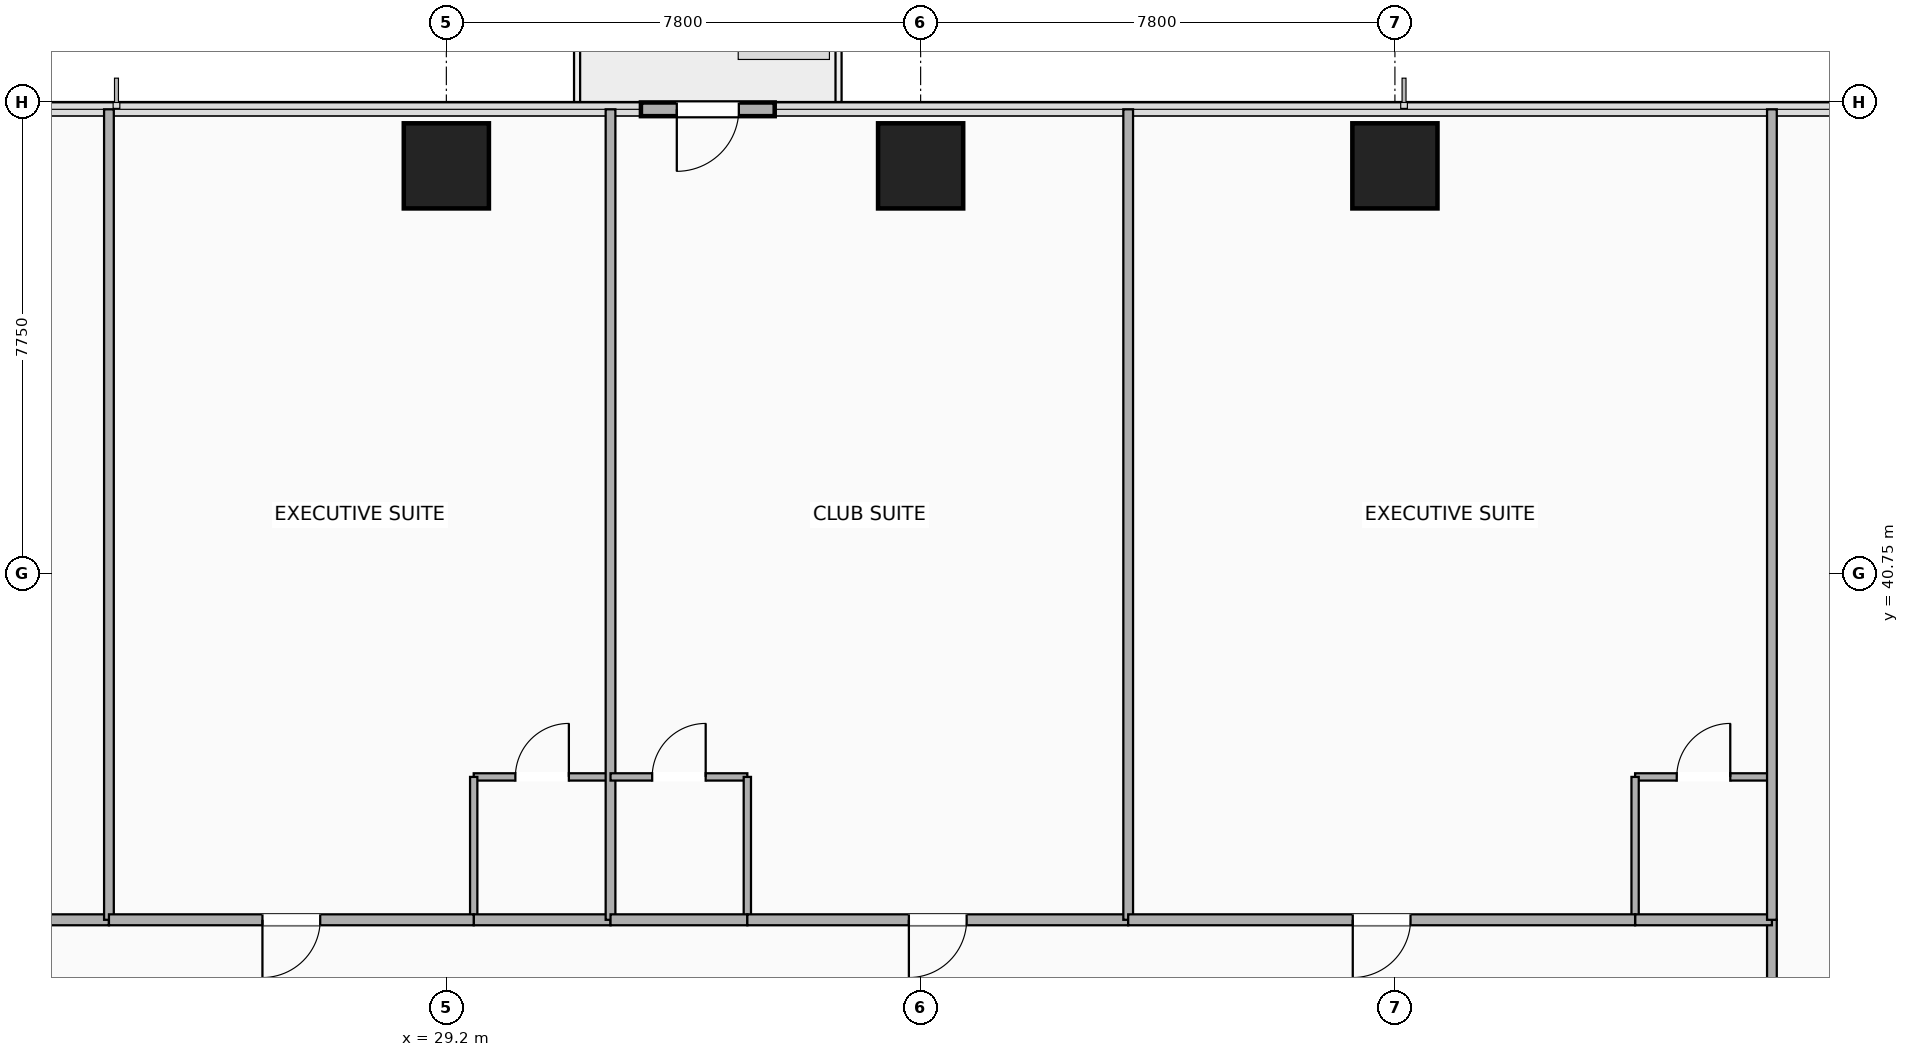
"""IFC4 building model, lengths in metres.
Left out: names, types, materials, properties, quantities, classifications, styles, units other than length and angle.
Written with IfcOpenShell. Run it as: python <this file> out.ifc"""

import sys

from ifc_helpers import new_model, si_unit, direction, frame, frame_2d, origin, origin_2d, place, context, subcontext, project, spatial, rectangle, extrude, element, fill, save


model = new_model("IFC4")
c1 = context("Model", 3, precision=1e-05, world=origin(), true_north=direction((0.0, 1.0)))
c2 = subcontext(c1, "Body", "Model", "MODEL_VIEW")
j1 = project(units=[si_unit("LENGTHUNIT", "METRE"), si_unit("PLANEANGLEUNIT", "RADIAN")], contexts=[c1])
p1 = place(None, origin())
s1 = spatial("IfcSite", under=j1, at=p1, CompositionType="ELEMENT")
p2 = place(p1, origin())
s2 = spatial("IfcBuilding", under=s1, at=p2, CompositionType="ELEMENT")
p3 = place(p2, frame((0.0, 0.0, 71.9)))
s3 = spatial("IfcBuildingStorey", under=s2, at=p3, CompositionType="ELEMENT", Elevation=71.9)
for number, where, z_axis, x_axis in (
    (1, (29.2, 47.45, -0.28), (0.0, 0.0, 1.0), (1.0, 0.0, 0.0)),
    (2, (37.0, 47.45, -0.28), (0.0, 0.0, 1.0), (1.0, 0.0, 0.0)),
    (3, (44.8, 47.45, -0.28), (0.0, 0.0, 1.0), (1.0, 0.0, 0.0)),
):
    element("IfcColumn", number, at=place(p3, frame(where, z_axis=z_axis, x_axis=x_axis)), inside=s3, PredefinedType="COLUMN", context=c2, shape_type="SweptSolid", body=[
        extrude(rectangle(XDim=1.4, YDim=1.4, at=origin_2d()), origin(), (0.0, 0.0, 1.0), 3.46),
    ])
p4 = place(p3, frame((32.4, 48.38, 0.0), z_axis=(0.0, 0.0, 1.0), x_axis=(1.0, 0.0, 0.0)))
e4 = element("IfcWall", 4, at=p4, inside=s3, PredefinedType="SOLIDWALL", context=c2, shape_type="SweptSolid", body=[
    extrude(rectangle(XDim=2.2, YDim=0.225, at=frame_2d((1.1, 0.0))), origin(), (0.0, 0.0, 1.0), 3.18),
])
p5 = place(p4, frame((0.59, 0.0, 0.0)))
e5 = element("IfcOpeningElement", 5, at=p5, cuts=e4, PredefinedType="OPENING", context=c2, shape_type="SweptSolid", body=[
    extrude(rectangle(XDim=1.02, YDim=2.1, at=frame_2d((0.51, 1.05))), frame((0.0, 0.123, 0.0), z_axis=(0.0, -1.0, 0.0), x_axis=(1.0, 0.0, 0.0)), (0.0, 0.0, 1.0), 0.245),
])
p6 = place(p3, frame((51.0, 33.0, 0.0), z_axis=(0.0, 0.0, 1.0), x_axis=(0.0, 1.0, 0.0)))
e6 = element("IfcWall", 6, at=p6, inside=s3, PredefinedType="PARTITIONING", context=c2, shape_type="SweptSolid", body=[
    extrude(rectangle(XDim=2.05, YDim=0.16, at=frame_2d((1.025, 0.0))), origin(), (0.0, 0.0, 1.0), 2.47),
])
p7 = place(p3, frame((17.52, 35.05, 0.0), z_axis=(0.0, 0.0, 1.0), x_axis=(1.0, 0.0, 0.0)))
e7 = element("IfcWall", 7, at=p7, inside=s3, PredefinedType="PARTITIONING", context=c2, shape_type="SweptSolid", body=[
    extrude(rectangle(XDim=6.131, YDim=0.18, at=frame_2d((3.065, 0.0))), origin(), (0.0, 0.0, 1.0), 2.47),
])
p8 = place(p7, frame((2.591, 0.0, 0.0)))
e8 = element("IfcOpeningElement", 8, at=p8, cuts=e7, PredefinedType="OPENING", context=c2, shape_type="SweptSolid", body=[
    extrude(rectangle(XDim=0.95, YDim=2.15, at=frame_2d((0.475, 1.075))), frame((0.0, 0.1, 0.0), z_axis=(0.0, -1.0, 0.0), x_axis=(1.0, 0.0, 0.0)), (0.0, 0.0, 1.0), 0.2),
])
p9 = place(p3, frame((23.651, 35.05, 0.0), z_axis=(0.0, 0.0, 1.0), x_axis=(0.0, 1.0, 0.0)))
e9 = element("IfcWall", 9, at=p9, inside=s3, PredefinedType="PARTITIONING", context=c2, shape_type="SweptSolid", body=[
    extrude(rectangle(XDim=13.33, YDim=0.16, at=frame_2d((6.665, 0.0))), origin(), (0.0, 0.0, 1.0), 2.543),
])
p10 = place(p3, frame((29.65, 37.4, 0.0), z_axis=(0.0, 0.0, 1.0), x_axis=(1.0, 0.0, 0.0)))
e10 = element("IfcWall", 10, at=p10, inside=s3, PredefinedType="PARTITIONING", context=c2, shape_type="SweptSolid", body=[
    extrude(rectangle(XDim=2.25, YDim=0.12, at=frame_2d((1.125, 0.0))), origin(), (0.0, 0.0, 1.0), 3.18),
])
p11 = place(p10, frame((1.565, 0.0, 0.0), z_axis=(0.0, 0.0, 1.0), x_axis=(-1.0, 0.0, 0.0)))
e11 = element("IfcOpeningElement", 11, at=p11, cuts=e10, PredefinedType="OPENING", context=c2, shape_type="SweptSolid", body=[
    extrude(rectangle(XDim=0.88, YDim=2.08, at=frame_2d((0.44, 1.04))), frame((0.0, 0.07, 0.0), z_axis=(0.0, -1.0, 0.0), x_axis=(1.0, 0.0, 0.0)), (0.0, 0.0, 1.0), 0.14),
])
p12 = place(p3, frame((29.65, 35.05, 0.0), z_axis=(0.0, 0.0, 1.0), x_axis=(0.0, 1.0, 0.0)))
e12 = element("IfcWall", 12, at=p12, inside=s3, PredefinedType="PARTITIONING", context=c2, shape_type="SweptSolid", body=[
    extrude(rectangle(XDim=2.35, YDim=0.12, at=frame_2d((1.175, 0.0))), origin(), (0.0, 0.0, 1.0), 2.862),
])
p13 = place(p3, frame((29.65, 35.05, 0.0), z_axis=(0.0, 0.0, 1.0), x_axis=(1.0, 0.0, 0.0)))
e13 = element("IfcWall", 13, at=p13, inside=s3, PredefinedType="PARTITIONING", context=c2, shape_type="SweptSolid", body=[
    extrude(rectangle(XDim=2.25, YDim=0.18, at=frame_2d((1.125, 0.0))), origin(), (0.0, 0.0, 1.0), 3.18),
])
p14 = place(p3, frame((23.651, 35.05, 0.0), z_axis=(0.0, 0.0, 1.0), x_axis=(1.0, 0.0, 0.0)))
e14 = element("IfcWall", 14, at=p14, inside=s3, PredefinedType="PARTITIONING", context=c2, shape_type="SweptSolid", body=[
    extrude(rectangle(XDim=5.999, YDim=0.18, at=frame_2d((3.0, 0.0))), origin(), (0.0, 0.0, 1.0), 2.47),
])
p15 = place(p14, frame((2.524, 0.0, 0.0)))
e15 = element("IfcOpeningElement", 15, at=p15, cuts=e14, PredefinedType="OPENING", context=c2, shape_type="SweptSolid", body=[
    extrude(rectangle(XDim=0.95, YDim=2.15, at=frame_2d((0.475, 1.075))), frame((0.0, 0.1, 0.0), z_axis=(0.0, -1.0, 0.0), x_axis=(1.0, 0.0, 0.0)), (0.0, 0.0, 1.0), 0.2),
])
p16 = place(p3, frame((31.9, 35.05, 0.0), z_axis=(0.0, 0.0, 1.0), x_axis=(0.0, 1.0, 0.0)))
e16 = element("IfcWall", 16, at=p16, inside=s3, PredefinedType="PARTITIONING", context=c2, shape_type="SweptSolid", body=[
    extrude(rectangle(XDim=13.33, YDim=0.16, at=frame_2d((6.665, 0.0))), origin(), (0.0, 0.0, 1.0), 2.543),
])
p17 = place(p3, frame((31.9, 37.4, 0.0), z_axis=(0.0, 0.0, 1.0), x_axis=(1.0, 0.0, 0.0)))
e17 = element("IfcWall", 17, at=p17, inside=s3, PredefinedType="PARTITIONING", context=c2, shape_type="SweptSolid", body=[
    extrude(rectangle(XDim=2.25, YDim=0.12, at=frame_2d((1.125, 0.0))), origin(), (0.0, 0.0, 1.0), 3.18),
])
p18 = place(p17, frame((1.565, 0.0, 0.0), z_axis=(0.0, 0.0, 1.0), x_axis=(-1.0, 0.0, 0.0)))
e18 = element("IfcOpeningElement", 18, at=p18, cuts=e17, PredefinedType="OPENING", context=c2, shape_type="SweptSolid", body=[
    extrude(rectangle(XDim=0.88, YDim=2.08, at=frame_2d((0.44, 1.04))), frame((0.0, 0.07, 0.0), z_axis=(0.0, -1.0, 0.0), x_axis=(1.0, 0.0, 0.0)), (0.0, 0.0, 1.0), 0.14),
])
p19 = place(p3, frame((34.15, 35.05, 0.0), z_axis=(0.0, 0.0, 1.0), x_axis=(0.0, 1.0, 0.0)))
e19 = element("IfcWall", 19, at=p19, inside=s3, PredefinedType="PARTITIONING", context=c2, shape_type="SweptSolid", body=[
    extrude(rectangle(XDim=2.35, YDim=0.12, at=frame_2d((1.175, 0.0))), origin(), (0.0, 0.0, 1.0), 2.862),
])
p20 = place(p3, frame((31.9, 35.05, 0.0), z_axis=(0.0, 0.0, 1.0), x_axis=(1.0, 0.0, 0.0)))
e20 = element("IfcWall", 20, at=p20, inside=s3, PredefinedType="PARTITIONING", context=c2, shape_type="SweptSolid", body=[
    extrude(rectangle(XDim=2.25, YDim=0.18, at=frame_2d((1.125, 0.0))), origin(), (0.0, 0.0, 1.0), 3.18),
])
p21 = place(p3, frame((34.15, 35.05, 0.0), z_axis=(0.0, 0.0, 1.0), x_axis=(1.0, 0.0, 0.0)))
e21 = element("IfcWall", 21, at=p21, inside=s3, PredefinedType="PARTITIONING", context=c2, shape_type="SweptSolid", body=[
    extrude(rectangle(XDim=6.263, YDim=0.18, at=frame_2d((3.132, 0.0))), origin(), (0.0, 0.0, 1.0), 2.47),
])
p22 = place(p21, frame((2.657, 0.0, 0.0)))
e22 = element("IfcOpeningElement", 22, at=p22, cuts=e21, PredefinedType="OPENING", context=c2, shape_type="SweptSolid", body=[
    extrude(rectangle(XDim=0.95, YDim=2.15, at=frame_2d((0.475, 1.075))), frame((0.0, 0.1, 0.0), z_axis=(0.0, -1.0, 0.0), x_axis=(1.0, 0.0, 0.0)), (0.0, 0.0, 1.0), 0.2),
])
p23 = place(p3, frame((40.413, 35.05, 0.0), z_axis=(0.0, 0.0, 1.0), x_axis=(0.0, 1.0, 0.0)))
e23 = element("IfcWall", 23, at=p23, inside=s3, PredefinedType="PARTITIONING", context=c2, shape_type="SweptSolid", body=[
    extrude(rectangle(XDim=13.33, YDim=0.16, at=frame_2d((6.665, 0.0))), origin(), (0.0, 0.0, 1.0), 2.543),
])
p24 = place(p3, frame((48.75, 37.4, 0.0), z_axis=(0.0, 0.0, 1.0), x_axis=(1.0, 0.0, 0.0)))
e24 = element("IfcWall", 24, at=p24, inside=s3, PredefinedType="PARTITIONING", context=c2, shape_type="SweptSolid", body=[
    extrude(rectangle(XDim=2.25, YDim=0.12, at=frame_2d((1.125, 0.0))), origin(), (0.0, 0.0, 1.0), 3.18),
])
p25 = place(p24, frame((1.565, 0.0, 0.0), z_axis=(0.0, 0.0, 1.0), x_axis=(-1.0, 0.0, 0.0)))
e25 = element("IfcOpeningElement", 25, at=p25, cuts=e24, PredefinedType="OPENING", context=c2, shape_type="SweptSolid", body=[
    extrude(rectangle(XDim=0.88, YDim=2.08, at=frame_2d((0.44, 1.04))), frame((0.0, 0.07, 0.0), z_axis=(0.0, -1.0, 0.0), x_axis=(1.0, 0.0, 0.0)), (0.0, 0.0, 1.0), 0.14),
])
p26 = place(p3, frame((48.75, 35.05, 0.0), z_axis=(0.0, 0.0, 1.0), x_axis=(0.0, 1.0, 0.0)))
e26 = element("IfcWall", 26, at=p26, inside=s3, PredefinedType="PARTITIONING", context=c2, shape_type="SweptSolid", body=[
    extrude(rectangle(XDim=2.35, YDim=0.12, at=frame_2d((1.175, 0.0))), origin(), (0.0, 0.0, 1.0), 3.18),
])
p27 = place(p3, frame((48.75, 35.05, 0.0), z_axis=(0.0, 0.0, 1.0), x_axis=(1.0, 0.0, 0.0)))
e27 = element("IfcWall", 27, at=p27, inside=s3, PredefinedType="PARTITIONING", context=c2, shape_type="SweptSolid", body=[
    extrude(rectangle(XDim=2.25, YDim=0.18, at=frame_2d((1.125, 0.0))), origin(), (0.0, 0.0, 1.0), 3.18),
])
p28 = place(p3, frame((40.413, 35.05, 0.0), z_axis=(0.0, 0.0, 1.0), x_axis=(1.0, 0.0, 0.0)))
e28 = element("IfcWall", 28, at=p28, inside=s3, PredefinedType="PARTITIONING", context=c2, shape_type="SweptSolid", body=[
    extrude(rectangle(XDim=8.337, YDim=0.18, at=frame_2d((4.168, 0.0))), origin(), (0.0, 0.0, 1.0), 2.47),
])
p29 = place(p28, frame((3.693, 0.0, 0.0)))
e29 = element("IfcOpeningElement", 29, at=p29, cuts=e28, PredefinedType="OPENING", context=c2, shape_type="SweptSolid", body=[
    extrude(rectangle(XDim=0.95, YDim=2.15, at=frame_2d((0.475, 1.075))), frame((0.0, 0.1, 0.0), z_axis=(0.0, -1.0, 0.0), x_axis=(1.0, 0.0, 0.0)), (0.0, 0.0, 1.0), 0.2),
])
p30 = place(p3, frame((51.0, 35.05, 0.0), z_axis=(0.0, 0.0, 1.0), x_axis=(0.0, 1.0, 0.0)))
e30 = element("IfcWall", 30, at=p30, inside=s3, PredefinedType="PARTITIONING", context=c2, shape_type="SweptSolid", body=[
    extrude(rectangle(XDim=13.33, YDim=0.16, at=frame_2d((6.665, 0.0))), origin(), (0.0, 0.0, 1.0), 3.18),
])
p31 = place(p5, origin())
e31 = element("IfcDoor", 31, at=p31, inside=s3, OperationType="SINGLE_SWING_LEFT", PredefinedType="DOOR", context=c2, shape_type="SweptSolid", body=[
    extrude(rectangle(XDim=1.02, YDim=2.1, at=frame_2d((0.51, 1.05))), frame((0.0, 0.025, 0.0), z_axis=(0.0, -1.0, 0.0), x_axis=(1.0, 0.0, 0.0)), (0.0, 0.0, 1.0), 0.05),
])
fill(e5, e31)
p32 = place(p11, origin())
e32 = element("IfcDoor", 32, at=p32, inside=s3, OperationType="SINGLE_SWING_RIGHT", PredefinedType="DOOR", context=c2, shape_type="SweptSolid", body=[
    extrude(rectangle(XDim=0.88, YDim=2.08, at=frame_2d((0.44, 1.04))), frame((0.0, 0.025, 0.0), z_axis=(0.0, -1.0, 0.0), x_axis=(1.0, 0.0, 0.0)), (0.0, 0.0, 1.0), 0.05),
])
fill(e11, e32)
p33 = place(p15, origin())
e33 = element("IfcDoor", 33, at=p33, inside=s3, OperationType="SINGLE_SWING_LEFT", PredefinedType="DOOR", context=c2, shape_type="SweptSolid", body=[
    extrude(rectangle(XDim=0.95, YDim=2.15, at=frame_2d((0.475, 1.075))), frame((0.0, 0.025, 0.0), z_axis=(0.0, -1.0, 0.0), x_axis=(1.0, 0.0, 0.0)), (0.0, 0.0, 1.0), 0.05),
])
fill(e15, e33)
p34 = place(p18, origin())
e34 = element("IfcDoor", 34, at=p34, inside=s3, OperationType="SINGLE_SWING_RIGHT", PredefinedType="DOOR", context=c2, shape_type="SweptSolid", body=[
    extrude(rectangle(XDim=0.88, YDim=2.08, at=frame_2d((0.44, 1.04))), frame((0.0, 0.025, 0.0), z_axis=(0.0, -1.0, 0.0), x_axis=(1.0, 0.0, 0.0)), (0.0, 0.0, 1.0), 0.05),
])
fill(e18, e34)
p35 = place(p22, origin())
e35 = element("IfcDoor", 35, at=p35, inside=s3, OperationType="SINGLE_SWING_LEFT", PredefinedType="DOOR", context=c2, shape_type="SweptSolid", body=[
    extrude(rectangle(XDim=0.95, YDim=2.15, at=frame_2d((0.475, 1.075))), frame((0.0, 0.025, 0.0), z_axis=(0.0, -1.0, 0.0), x_axis=(1.0, 0.0, 0.0)), (0.0, 0.0, 1.0), 0.05),
])
fill(e22, e35)
p36 = place(p25, origin())
e36 = element("IfcDoor", 36, at=p36, inside=s3, OperationType="SINGLE_SWING_RIGHT", PredefinedType="DOOR", context=c2, shape_type="SweptSolid", body=[
    extrude(rectangle(XDim=0.88, YDim=2.08, at=frame_2d((0.44, 1.04))), frame((0.0, 0.025, 0.0), z_axis=(0.0, -1.0, 0.0), x_axis=(1.0, 0.0, 0.0)), (0.0, 0.0, 1.0), 0.05),
])
fill(e25, e36)
p37 = place(p29, origin())
e37 = element("IfcDoor", 37, at=p37, inside=s3, OperationType="SINGLE_SWING_LEFT", PredefinedType="DOOR", context=c2, shape_type="SweptSolid", body=[
    extrude(rectangle(XDim=0.95, YDim=2.15, at=frame_2d((0.475, 1.075))), frame((0.0, 0.025, 0.0), z_axis=(0.0, -1.0, 0.0), x_axis=(1.0, 0.0, 0.0)), (0.0, 0.0, 1.0), 0.05),
])
fill(e29, e37)
save(model, sys.argv[1])
